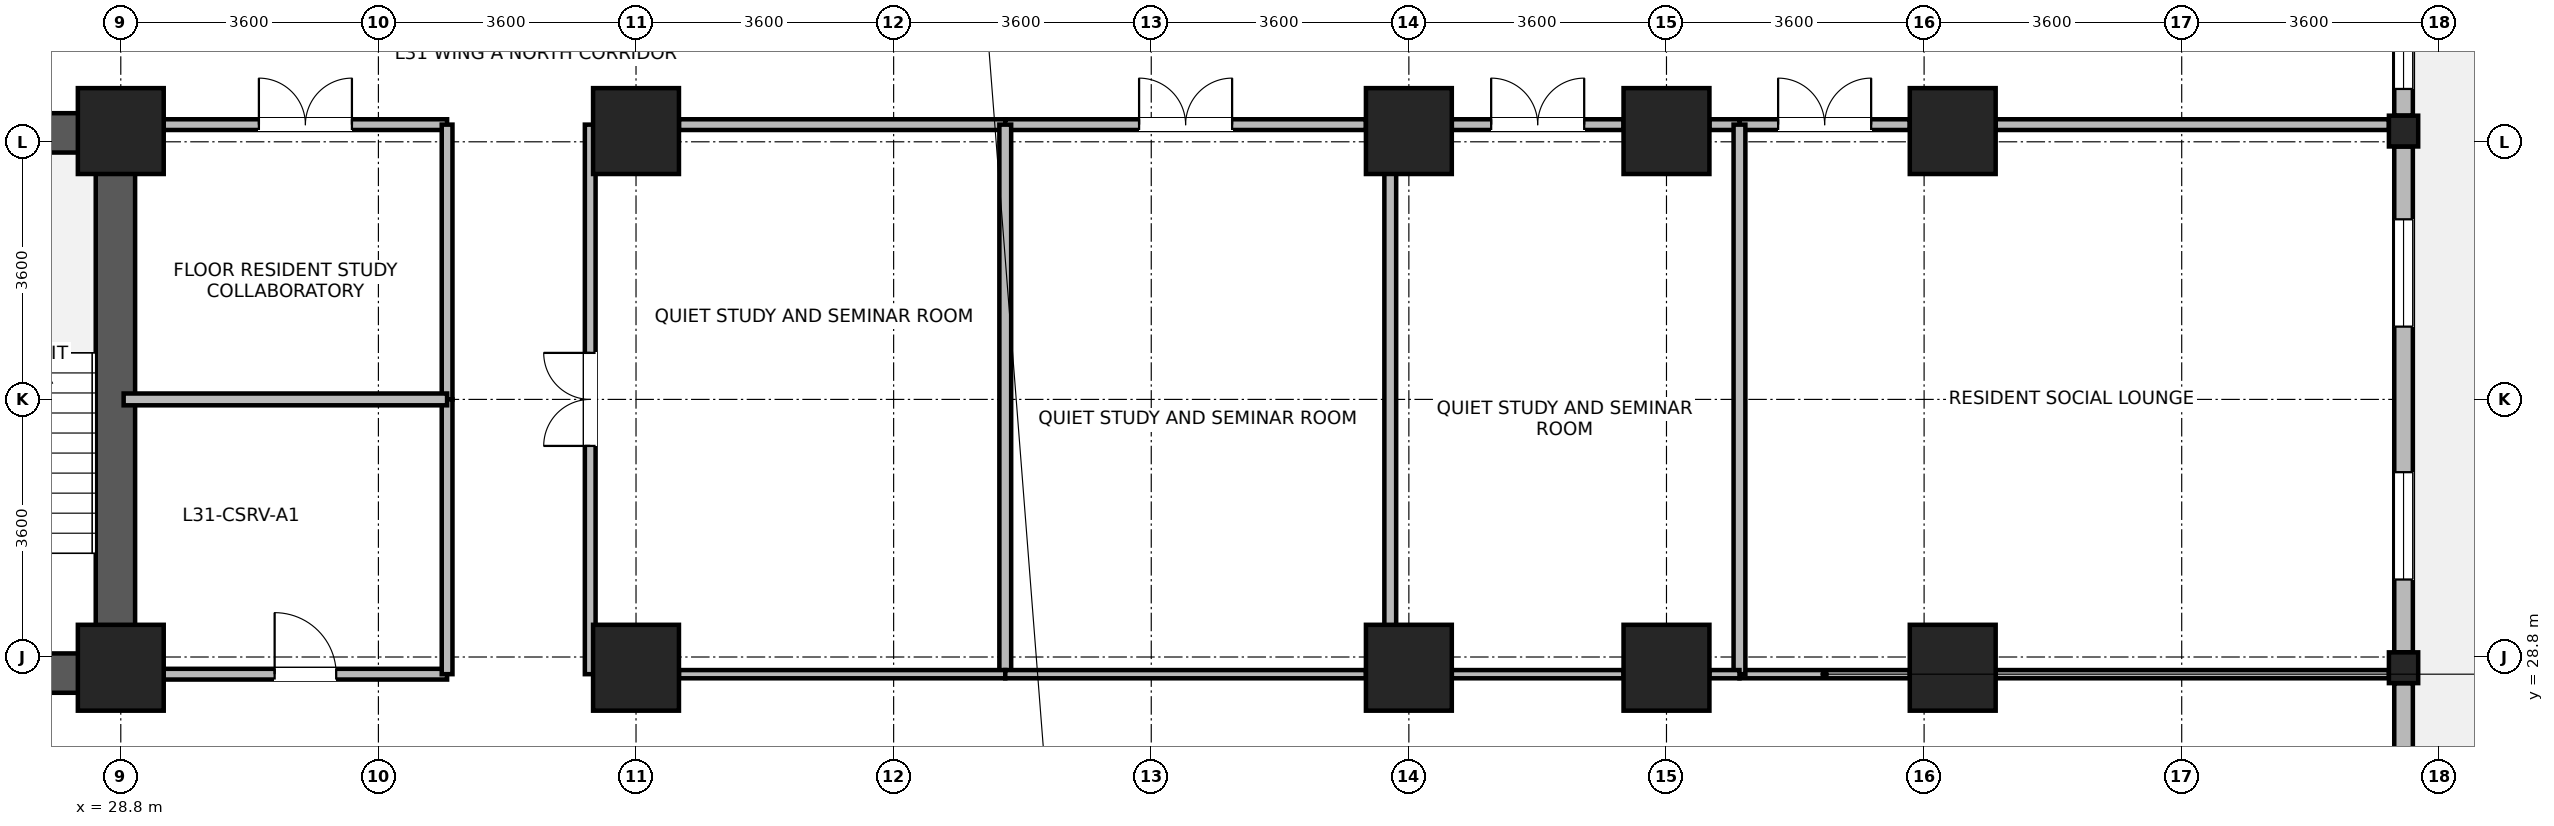
"""IFC4 building model, lengths in metres.
Left out: names, types, materials, properties, quantities, classifications, styles, units other than length and angle.
Written with IfcOpenShell. Run it as: python <this file> out.ifc"""

import sys

from ifc_helpers import new_model, si_unit, direction, frame, frame_2d, origin, origin_2d, place, context, subcontext, project, spatial, rectangle, i_section, extrude, source, transform, mapped, element, fill, save


model = new_model("IFC4")
c1 = context("Model", 3, precision=1e-05, world=origin(), true_north=direction((0.0, 1.0)))
c2 = subcontext(c1, "Body", "Model", "MODEL_VIEW")
j1 = project(units=[si_unit("LENGTHUNIT", "METRE"), si_unit("PLANEANGLEUNIT", "RADIAN")], contexts=[c1])
p1 = place(None, origin())
s1 = spatial("IfcSite", under=j1, at=p1, CompositionType="ELEMENT")
p2 = place(p1, origin())
s2 = spatial("IfcBuilding", under=s1, at=p2, CompositionType="ELEMENT")
p3 = place(p2, frame((0.0, 0.0, 123.0)))
s3 = spatial("IfcBuildingStorey", under=s2, at=p3, CompositionType="ELEMENT", Elevation=123.0)
p4 = place(p3, frame((28.725, 28.3, 0.0), z_axis=(0.0, 0.0, 1.0), x_axis=(0.0, 1.0, 0.0)))
e1 = element("IfcWall", 1, at=p4, inside=s3, PredefinedType="SHEAR", context=c2, shape_type="SweptSolid", body=[
    extrude(rectangle(XDim=8.1, YDim=0.55, at=frame_2d((4.05, 0.0))), origin(), (0.0, 0.0, 1.0), 3.45),
])
for number, where, z_axis, x_axis in (
    (2, (25.25, 28.575, 0.0), (0.0, 0.0, 1.0), (1.0, 0.0, 0.0)),
    (3, (25.25, 36.125, 0.0), (0.0, 0.0, 1.0), (1.0, 0.0, 0.0)),
):
    element("IfcWall", number, at=place(p3, frame(where, z_axis=z_axis, x_axis=x_axis)), inside=s3, PredefinedType="SHEAR", context=c2, shape_type="SweptSolid", body=[
        extrude(rectangle(XDim=3.2, YDim=0.55, at=frame_2d((1.6, 0.0))), origin(), (0.0, 0.0, 1.0), 3.45),
    ])
m1 = source(origin(), c2, "Body", "SweptSolid", [
    extrude(rectangle(XDim=1.2, YDim=1.2, at=origin_2d()), origin(), (0.0, 0.0, 1.0), 3.7),
])
for number, where, z_axis, x_axis in (
    (4, (28.8, 28.65, 0.0), (0.0, 0.0, 1.0), (1.0, 0.0, 0.0)),
    (5, (28.8, 36.15, 0.0), (0.0, 0.0, 1.0), (1.0, 0.0, 0.0)),
    (6, (36.0, 28.65, 0.0), (0.0, 0.0, 1.0), (1.0, 0.0, 0.0)),
    (7, (36.0, 36.15, 0.0), (0.0, 0.0, 1.0), (1.0, 0.0, 0.0)),
    (8, (46.8, 28.65, 0.0), (0.0, 0.0, 1.0), (1.0, 0.0, 0.0)),
    (9, (46.8, 36.15, 0.0), (0.0, 0.0, 1.0), (1.0, 0.0, 0.0)),
    (10, (50.4, 28.65, 0.0), (0.0, 0.0, 1.0), (1.0, 0.0, 0.0)),
    (11, (50.4, 36.15, 0.0), (0.0, 0.0, 1.0), (1.0, 0.0, 0.0)),
    (12, (54.4, 28.65, 0.0), (0.0, 0.0, 1.0), (1.0, 0.0, 0.0)),
    (13, (54.4, 36.15, 0.0), (0.0, 0.0, 1.0), (1.0, 0.0, 0.0)),
):
    element("IfcColumn", number, at=place(p3, frame(where, z_axis=z_axis, x_axis=x_axis)), inside=s3, PredefinedType="COLUMN", context=c2, shape_type="MappedRepresentation", body=[
        mapped(m1, transform((0.0, 0.0, 0.0), x_axis=(1.0, 0.0, 0.0), y_axis=(0.0, 1.0, 0.0), z_axis=(0.0, 0.0, 1.0), scale=1.0)),
    ])
m2 = source(origin(), c2, "Body", "SweptSolid", [
    extrude(i_section(OverallWidth=0.409, OverallDepth=0.43, WebThickness=0.024, FlangeThickness=0.033, FilletRadius=0.015, at=origin_2d()), origin(), (0.0, 0.0, 1.0), 3.7),
])
for number, where, z_axis, x_axis in (
    (14, (60.7, 28.65, 0.0), (0.0, 0.0, 1.0), (1.0, 0.0, 0.0)),
    (15, (60.7, 36.15, 0.0), (0.0, 0.0, 1.0), (1.0, 0.0, 0.0)),
):
    element("IfcColumn", number, at=place(p3, frame(where, z_axis=z_axis, x_axis=x_axis)), inside=s3, PredefinedType="COLUMN", context=c2, shape_type="MappedRepresentation", body=[
        mapped(m2, transform((0.0, 0.0, 0.0), x_axis=(1.0, 0.0, 0.0), y_axis=(0.0, 1.0, 0.0), z_axis=(0.0, 0.0, 1.0), scale=1.0)),
    ])
p5 = place(p3, frame((60.7, 28.434, 0.0), z_axis=(0.0, 0.0, 1.0), x_axis=(0.0, -1.0, 0.0)))
e16 = element("IfcWall", 16, at=p5, inside=s3, PredefinedType="STANDARD", context=c2, shape_type="SweptSolid", body=[
    extrude(rectangle(XDim=6.618, YDim=0.26, at=frame_2d((3.309, 0.0))), origin(), (0.0, 0.0, 1.0), 2.98),
])
p6 = place(p5, frame((4.213, 0.0, 0.85)))
e17 = element("IfcOpeningElement", 17, at=p6, cuts=e16, PredefinedType="OPENING", context=c2, shape_type="SweptSolid", body=[
    extrude(rectangle(XDim=1.5, YDim=1.85, at=frame_2d((0.75, 0.925))), frame((0.0, 0.14, 0.0), z_axis=(0.0, -1.0, 0.0), x_axis=(1.0, 0.0, 0.0)), (0.0, 0.0, 1.0), 0.28),
])
p7 = place(p5, frame((2.834, 0.0, 0.85)))
e18 = element("IfcOpeningElement", 18, at=p7, cuts=e16, PredefinedType="OPENING", context=c2, shape_type="SweptSolid", body=[
    extrude(rectangle(XDim=0.95, YDim=1.75, at=frame_2d((0.475, 0.875))), frame((0.0, 0.14, 0.0), z_axis=(0.0, -1.0, 0.0), x_axis=(1.0, 0.0, 0.0)), (0.0, 0.0, 1.0), 0.28),
])
p8 = place(p3, frame((60.7, 35.934, 0.0), z_axis=(0.0, 0.0, 1.0), x_axis=(0.0, -1.0, 0.0)))
e19 = element("IfcWall", 19, at=p8, inside=s3, PredefinedType="STANDARD", context=c2, shape_type="SweptSolid", body=[
    extrude(rectangle(XDim=7.068, YDim=0.26, at=frame_2d((3.534, 0.0))), origin(), (0.0, 0.0, 1.0), 2.98),
])
p9 = place(p8, frame((1.017, 0.0, 0.85)))
e20 = element("IfcOpeningElement", 20, at=p9, cuts=e19, PredefinedType="OPENING", context=c2, shape_type="SweptSolid", body=[
    extrude(rectangle(XDim=1.5, YDim=1.85, at=frame_2d((0.75, 0.925))), frame((0.0, 0.14, 0.0), z_axis=(0.0, -1.0, 0.0), x_axis=(1.0, 0.0, 0.0)), (0.0, 0.0, 1.0), 0.28),
])
p10 = place(p8, frame((4.551, 0.0, 0.85)))
e21 = element("IfcOpeningElement", 21, at=p10, cuts=e19, PredefinedType="OPENING", context=c2, shape_type="SweptSolid", body=[
    extrude(rectangle(XDim=1.5, YDim=1.85, at=frame_2d((0.75, 0.925))), frame((0.0, 0.14, 0.0), z_axis=(0.0, -1.0, 0.0), x_axis=(1.0, 0.0, 0.0)), (0.0, 0.0, 1.0), 0.28),
])
p11 = place(p3, frame((60.7, 39.73, 0.0), z_axis=(0.0, 0.0, 1.0), x_axis=(0.0, -1.0, 0.0)))
e22 = element("IfcWall", 22, at=p11, inside=s3, PredefinedType="STANDARD", context=c2, shape_type="SweptSolid", body=[
    extrude(rectangle(XDim=3.364, YDim=0.26, at=frame_2d((1.682, 0.0))), origin(), (0.0, 0.0, 1.0), 3.43),
])
p12 = place(p11, frame((2.041, 0.0, 0.85)))
e23 = element("IfcOpeningElement", 23, at=p12, cuts=e22, PredefinedType="OPENING", context=c2, shape_type="SweptSolid", body=[
    extrude(rectangle(XDim=0.95, YDim=1.75, at=frame_2d((0.475, 0.875))), frame((0.0, 0.14, 0.0), z_axis=(0.0, -1.0, 0.0), x_axis=(1.0, 0.0, 0.0)), (0.0, 0.0, 1.0), 0.28),
])
p13 = place(p11, frame((0.265, 0.0, 0.85)))
e24 = element("IfcOpeningElement", 24, at=p13, cuts=e22, PredefinedType="OPENING", context=c2, shape_type="SweptSolid", body=[
    extrude(rectangle(XDim=0.95, YDim=1.75, at=frame_2d((0.475, 0.875))), frame((0.0, 0.14, 0.0), z_axis=(0.0, -1.0, 0.0), x_axis=(1.0, 0.0, 0.0)), (0.0, 0.0, 1.0), 0.28),
])
p14 = place(p3, frame((51.42, 36.24, 0.0), z_axis=(0.0, 0.0, 1.0), x_axis=(1.0, 0.0, 0.0)))
e25 = element("IfcWall", 25, at=p14, inside=s3, PredefinedType="PARTITIONING", context=c2, shape_type="SweptSolid", body=[
    extrude(rectangle(XDim=2.38, YDim=0.15, at=frame_2d((1.19, 0.0))), origin(), (0.0, 0.0, 1.0), 2.78),
])
p15 = place(p14, frame((0.54, 0.0, 0.0)))
e26 = element("IfcOpeningElement", 26, at=p15, cuts=e25, PredefinedType="OPENING", context=c2, shape_type="SweptSolid", body=[
    extrude(rectangle(XDim=1.3, YDim=2.12, at=frame_2d((0.65, 1.06))), frame((0.0, 0.085, 0.0), z_axis=(0.0, -1.0, 0.0), x_axis=(1.0, 0.0, 0.0)), (0.0, 0.0, 1.0), 0.17),
])
p16 = place(p3, frame((55.0, 36.24, 0.0), z_axis=(0.0, 0.0, 1.0), x_axis=(1.0, 0.0, 0.0)))
e27 = element("IfcWall", 27, at=p16, inside=s3, PredefinedType="PARTITIONING", context=c2, shape_type="SweptSolid", body=[
    extrude(rectangle(XDim=5.496, YDim=0.15, at=frame_2d((2.748, 0.0))), origin(), (0.0, 0.0, 1.0), 2.78),
])
p17 = place(p3, frame((35.36, 28.56, 0.0), z_axis=(0.0, 0.0, 1.0), x_axis=(0.0, 1.0, 0.0)))
e28 = element("IfcWall", 28, at=p17, inside=s3, PredefinedType="PARTITIONING", context=c2, shape_type="SweptSolid", body=[
    extrude(rectangle(XDim=7.68, YDim=0.15, at=frame_2d((3.84, 0.0))), origin(), (0.0, 0.0, 1.0), 3.43),
])
p18 = place(p17, frame((3.19, 0.0, 0.0)))
e29 = element("IfcOpeningElement", 29, at=p18, cuts=e28, PredefinedType="OPENING", context=c2, shape_type="SweptSolid", body=[
    extrude(rectangle(XDim=1.3, YDim=2.12, at=frame_2d((0.65, 1.06))), frame((0.0, 0.085, 0.0), z_axis=(0.0, -1.0, 0.0), x_axis=(1.0, 0.0, 0.0)), (0.0, 0.0, 1.0), 0.17),
])
p19 = place(p3, frame((36.6, 36.24, 0.0), z_axis=(0.0, 0.0, 1.0), x_axis=(1.0, 0.0, 0.0)))
e30 = element("IfcWall", 30, at=p19, inside=s3, PredefinedType="PARTITIONING", context=c2, shape_type="SweptSolid", body=[
    extrude(rectangle(XDim=4.56, YDim=0.15, at=frame_2d((2.28, 0.0))), origin(), (0.0, 0.0, 1.0), 2.78),
])
p20 = place(p3, frame((41.16, 36.24, 0.0), z_axis=(0.0, 0.0, 1.0), x_axis=(1.0, 0.0, 0.0)))
e31 = element("IfcWall", 31, at=p20, inside=s3, PredefinedType="PARTITIONING", context=c2, shape_type="SweptSolid", body=[
    extrude(rectangle(XDim=5.04, YDim=0.15, at=frame_2d((2.52, 0.0))), origin(), (0.0, 0.0, 1.0), 2.78),
])
p21 = place(p20, frame((1.87, 0.0, 0.0)))
e32 = element("IfcOpeningElement", 32, at=p21, cuts=e31, PredefinedType="OPENING", context=c2, shape_type="SweptSolid", body=[
    extrude(rectangle(XDim=1.3, YDim=2.12, at=frame_2d((0.65, 1.06))), frame((0.0, 0.085, 0.0), z_axis=(0.0, -1.0, 0.0), x_axis=(1.0, 0.0, 0.0)), (0.0, 0.0, 1.0), 0.17),
])
p22 = place(p3, frame((47.4, 36.24, 0.0), z_axis=(0.0, 0.0, 1.0), x_axis=(1.0, 0.0, 0.0)))
e33 = element("IfcWall", 33, at=p22, inside=s3, PredefinedType="PARTITIONING", context=c2, shape_type="SweptSolid", body=[
    extrude(rectangle(XDim=2.4, YDim=0.15, at=frame_2d((1.2, 0.0))), origin(), (0.0, 0.0, 1.0), 2.78),
])
p23 = place(p22, frame((0.55, 0.0, 0.0)))
e34 = element("IfcOpeningElement", 34, at=p23, cuts=e33, PredefinedType="OPENING", context=c2, shape_type="SweptSolid", body=[
    extrude(rectangle(XDim=1.3, YDim=2.12, at=frame_2d((0.65, 1.06))), frame((0.0, 0.085, 0.0), z_axis=(0.0, -1.0, 0.0), x_axis=(1.0, 0.0, 0.0)), (0.0, 0.0, 1.0), 0.17),
])
p24 = place(p3, frame((51.0, 36.24, 0.0), z_axis=(0.0, 0.0, 1.0), x_axis=(1.0, 0.0, 0.0)))
e35 = element("IfcWall", 35, at=p24, inside=s3, PredefinedType="PARTITIONING", context=c2, shape_type="SweptSolid", body=[
    extrude(rectangle(XDim=0.42, YDim=0.15, at=frame_2d((0.21, 0.0))), origin(), (0.0, 0.0, 1.0), 2.78),
])
p25 = place(p3, frame((29.4, 28.56, 0.0), z_axis=(0.0, 0.0, 1.0), x_axis=(1.0, 0.0, 0.0)))
e36 = element("IfcWall", 36, at=p25, inside=s3, PredefinedType="PARTITIONING", context=c2, shape_type="SweptSolid", body=[
    extrude(rectangle(XDim=3.96, YDim=0.15, at=frame_2d((1.98, 0.0))), origin(), (0.0, 0.0, 1.0), 2.78),
])
p26 = place(p25, frame((1.55, 0.0, 0.0)))
e37 = element("IfcOpeningElement", 37, at=p26, cuts=e36, PredefinedType="OPENING", context=c2, shape_type="SweptSolid", body=[
    extrude(rectangle(XDim=0.86, YDim=2.02, at=frame_2d((0.43, 1.01))), frame((0.0, 0.085, 0.0), z_axis=(0.0, -1.0, 0.0), x_axis=(1.0, 0.0, 0.0)), (0.0, 0.0, 1.0), 0.17),
])
p27 = place(p3, frame((29.4, 36.24, 0.0), z_axis=(0.0, 0.0, 1.0), x_axis=(1.0, 0.0, 0.0)))
e38 = element("IfcWall", 38, at=p27, inside=s3, PredefinedType="PARTITIONING", context=c2, shape_type="SweptSolid", body=[
    extrude(rectangle(XDim=3.96, YDim=0.15, at=frame_2d((1.98, 0.0))), origin(), (0.0, 0.0, 1.0), 2.78),
])
p28 = place(p27, frame((1.33, 0.0, 0.0)))
e39 = element("IfcOpeningElement", 39, at=p28, cuts=e38, PredefinedType="OPENING", context=c2, shape_type="SweptSolid", body=[
    extrude(rectangle(XDim=1.3, YDim=2.12, at=frame_2d((0.65, 1.06))), frame((0.0, 0.085, 0.0), z_axis=(0.0, -1.0, 0.0), x_axis=(1.0, 0.0, 0.0)), (0.0, 0.0, 1.0), 0.17),
])
p29 = place(p3, frame((33.36, 32.4, 0.0), z_axis=(0.0, 0.0, 1.0), x_axis=(0.0, 1.0, 0.0)))
e40 = element("IfcWall", 40, at=p29, inside=s3, PredefinedType="PARTITIONING", context=c2, shape_type="SweptSolid", body=[
    extrude(rectangle(XDim=3.84, YDim=0.15, at=frame_2d((1.92, 0.0))), origin(), (0.0, 0.0, 1.0), 3.43),
])
p30 = place(p3, frame((33.36, 28.56, 0.0), z_axis=(0.0, 0.0, 1.0), x_axis=(0.0, 1.0, 0.0)))
e41 = element("IfcWall", 41, at=p30, inside=s3, PredefinedType="PARTITIONING", context=c2, shape_type="SweptSolid", body=[
    extrude(rectangle(XDim=3.84, YDim=0.15, at=frame_2d((1.92, 0.0))), origin(), (0.0, 0.0, 1.0), 3.43),
])
p31 = place(p3, frame((51.42, 28.56, 0.0), z_axis=(0.0, 0.0, 1.0), x_axis=(1.0, 0.0, 0.0)))
e42 = element("IfcWall", 42, at=p31, inside=s3, PredefinedType="PARTITIONING", context=c2, shape_type="SweptSolid", body=[
    extrude(rectangle(XDim=2.38, YDim=0.115, at=frame_2d((1.19, 0.0))), origin(), (0.0, 0.0, 1.0), 2.78),
])
p32 = place(p3, frame((55.0, 28.56, 0.0), z_axis=(0.0, 0.0, 1.0), x_axis=(1.0, 0.0, 0.0)))
e43 = element("IfcWall", 43, at=p32, inside=s3, PredefinedType="PARTITIONING", context=c2, shape_type="SweptSolid", body=[
    extrude(rectangle(XDim=5.496, YDim=0.115, at=frame_2d((2.748, 0.0))), origin(), (0.0, 0.0, 1.0), 2.78),
])
for number, where, z_axis, x_axis in (
    (44, (41.16, 28.56, 0.0), (0.0, 0.0, 1.0), (0.0, 1.0, 0.0)),
    (45, (46.54, 28.56, 0.0), (0.0, 0.0, 1.0), (0.0, 1.0, 0.0)),
    (46, (51.42, 28.56, 0.0), (0.0, 0.0, 1.0), (0.0, 1.0, 0.0)),
):
    element("IfcWall", number, at=place(p3, frame(where, z_axis=z_axis, x_axis=x_axis)), inside=s3, PredefinedType="PARTITIONING", context=c2, shape_type="SweptSolid", body=[
        extrude(rectangle(XDim=7.68, YDim=0.165, at=frame_2d((3.84, 0.0))), origin(), (0.0, 0.0, 1.0), 3.43),
    ])
p33 = place(p3, frame((36.6, 28.56, 0.0), z_axis=(0.0, 0.0, 1.0), x_axis=(1.0, 0.0, 0.0)))
e47 = element("IfcWall", 47, at=p33, inside=s3, PredefinedType="PARTITIONING", context=c2, shape_type="SweptSolid", body=[
    extrude(rectangle(XDim=4.56, YDim=0.115, at=frame_2d((2.28, 0.0))), origin(), (0.0, 0.0, 1.0), 2.78),
])
p34 = place(p3, frame((41.16, 28.56, 0.0), z_axis=(0.0, 0.0, 1.0), x_axis=(1.0, 0.0, 0.0)))
e48 = element("IfcWall", 48, at=p34, inside=s3, PredefinedType="PARTITIONING", context=c2, shape_type="SweptSolid", body=[
    extrude(rectangle(XDim=5.04, YDim=0.115, at=frame_2d((2.52, 0.0))), origin(), (0.0, 0.0, 1.0), 2.78),
])
p35 = place(p3, frame((47.4, 28.56, 0.0), z_axis=(0.0, 0.0, 1.0), x_axis=(1.0, 0.0, 0.0)))
e49 = element("IfcWall", 49, at=p35, inside=s3, PredefinedType="PARTITIONING", context=c2, shape_type="SweptSolid", body=[
    extrude(rectangle(XDim=2.4, YDim=0.115, at=frame_2d((1.2, 0.0))), origin(), (0.0, 0.0, 1.0), 2.78),
])
p36 = place(p3, frame((51.0, 28.56, 0.0), z_axis=(0.0, 0.0, 1.0), x_axis=(1.0, 0.0, 0.0)))
e50 = element("IfcWall", 50, at=p36, inside=s3, PredefinedType="PARTITIONING", context=c2, shape_type="SweptSolid", body=[
    extrude(rectangle(XDim=0.42, YDim=0.115, at=frame_2d((0.21, 0.0))), origin(), (0.0, 0.0, 1.0), 2.78),
])
p37 = place(p3, frame((28.84, 32.4, 0.0), z_axis=(0.0, 0.0, 1.0), x_axis=(1.0, 0.0, 0.0)))
e51 = element("IfcWall", 51, at=p37, inside=s3, PredefinedType="PARTITIONING", context=c2, shape_type="SweptSolid", body=[
    extrude(rectangle(XDim=4.52, YDim=0.165, at=frame_2d((2.26, 0.0))), origin(), (0.0, 0.0, 1.0), 3.43),
])
p38 = place(p9, origin())
e52 = element("IfcWindow", 52, at=p38, inside=s3, PartitioningType="SINGLE_PANEL", PredefinedType="WINDOW", context=c2, shape_type="SweptSolid", body=[
    extrude(rectangle(XDim=1.5, YDim=1.85, at=frame_2d((0.75, 0.925))), frame((0.0, 0.03, 0.0), z_axis=(0.0, -1.0, 0.0), x_axis=(1.0, 0.0, 0.0)), (0.0, 0.0, 1.0), 0.06),
])
fill(e20, e52)
p39 = place(p10, origin())
e53 = element("IfcWindow", 53, at=p39, inside=s3, PartitioningType="SINGLE_PANEL", PredefinedType="WINDOW", context=c2, shape_type="SweptSolid", body=[
    extrude(rectangle(XDim=1.5, YDim=1.85, at=frame_2d((0.75, 0.925))), frame((0.0, 0.03, 0.0), z_axis=(0.0, -1.0, 0.0), x_axis=(1.0, 0.0, 0.0)), (0.0, 0.0, 1.0), 0.06),
])
fill(e21, e53)
p40 = place(p12, origin())
e54 = element("IfcWindow", 54, at=p40, inside=s3, PartitioningType="SINGLE_PANEL", PredefinedType="WINDOW", context=c2, shape_type="SweptSolid", body=[
    extrude(rectangle(XDim=0.95, YDim=1.75, at=frame_2d((0.475, 0.875))), frame((0.0, 0.03, 0.0), z_axis=(0.0, -1.0, 0.0), x_axis=(1.0, 0.0, 0.0)), (0.0, 0.0, 1.0), 0.06),
])
fill(e23, e54)
p41 = place(p15, origin())
e55 = element("IfcDoor", 55, at=p41, inside=s3, OperationType="DOUBLE_DOOR_SINGLE_SWING", PredefinedType="DOOR", context=c2, shape_type="SweptSolid", body=[
    extrude(rectangle(XDim=1.3, YDim=2.12, at=frame_2d((0.65, 1.06))), frame((0.0, 0.025, 0.0), z_axis=(0.0, -1.0, 0.0), x_axis=(1.0, 0.0, 0.0)), (0.0, 0.0, 1.0), 0.05),
])
fill(e26, e55)
p42 = place(p18, origin())
e56 = element("IfcDoor", 56, at=p42, inside=s3, OperationType="DOUBLE_DOOR_SINGLE_SWING", PredefinedType="DOOR", context=c2, shape_type="SweptSolid", body=[
    extrude(rectangle(XDim=1.3, YDim=2.12, at=frame_2d((0.65, 1.06))), frame((0.0, 0.025, 0.0), z_axis=(0.0, -1.0, 0.0), x_axis=(1.0, 0.0, 0.0)), (0.0, 0.0, 1.0), 0.05),
])
fill(e29, e56)
p43 = place(p21, origin())
e57 = element("IfcDoor", 57, at=p43, inside=s3, OperationType="DOUBLE_DOOR_SINGLE_SWING", PredefinedType="DOOR", context=c2, shape_type="SweptSolid", body=[
    extrude(rectangle(XDim=1.3, YDim=2.12, at=frame_2d((0.65, 1.06))), frame((0.0, 0.025, 0.0), z_axis=(0.0, -1.0, 0.0), x_axis=(1.0, 0.0, 0.0)), (0.0, 0.0, 1.0), 0.05),
])
fill(e32, e57)
p44 = place(p23, origin())
e58 = element("IfcDoor", 58, at=p44, inside=s3, OperationType="DOUBLE_DOOR_SINGLE_SWING", PredefinedType="DOOR", context=c2, shape_type="SweptSolid", body=[
    extrude(rectangle(XDim=1.3, YDim=2.12, at=frame_2d((0.65, 1.06))), frame((0.0, 0.025, 0.0), z_axis=(0.0, -1.0, 0.0), x_axis=(1.0, 0.0, 0.0)), (0.0, 0.0, 1.0), 0.05),
])
fill(e34, e58)
p45 = place(p26, origin())
e59 = element("IfcDoor", 59, at=p45, inside=s3, OperationType="SINGLE_SWING_LEFT", PredefinedType="DOOR", context=c2, shape_type="SweptSolid", body=[
    extrude(rectangle(XDim=0.86, YDim=2.02, at=frame_2d((0.43, 1.01))), frame((0.0, 0.025, 0.0), z_axis=(0.0, -1.0, 0.0), x_axis=(1.0, 0.0, 0.0)), (0.0, 0.0, 1.0), 0.05),
])
fill(e37, e59)
p46 = place(p28, origin())
e60 = element("IfcDoor", 60, at=p46, inside=s3, OperationType="DOUBLE_DOOR_SINGLE_SWING", PredefinedType="DOOR", context=c2, shape_type="SweptSolid", body=[
    extrude(rectangle(XDim=1.3, YDim=2.12, at=frame_2d((0.65, 1.06))), frame((0.0, 0.025, 0.0), z_axis=(0.0, -1.0, 0.0), x_axis=(1.0, 0.0, 0.0)), (0.0, 0.0, 1.0), 0.05),
])
fill(e39, e60)
save(model, sys.argv[1])
